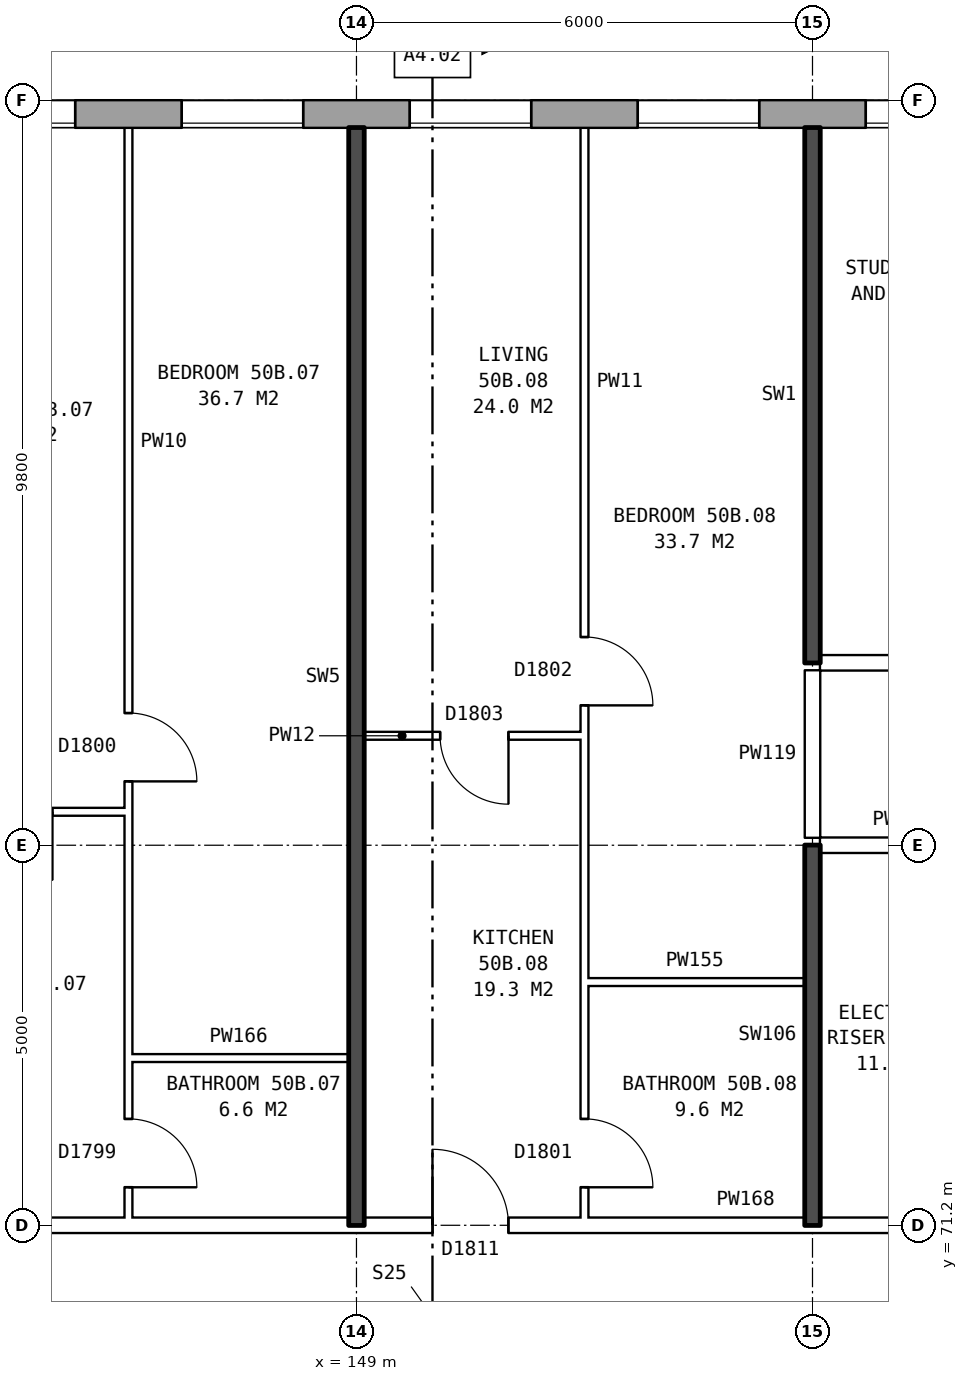
"""IFC4 building model, lengths in metres.
Left out: names, types, materials, properties, quantities, classifications, styles, units other than length and angle.
Written with IfcOpenShell. Run it as: python <this file> out.ifc"""

import sys

from ifc_helpers import new_model, si_unit, direction, frame, frame_2d, origin, place, context, subcontext, project, spatial, rectangle, extrude, element, fill, save


model = new_model("IFC4")
c1 = context("Model", 3, precision=1e-05, world=origin(), true_north=direction((0.0, 1.0)))
c2 = subcontext(c1, "Body", "Model", "MODEL_VIEW")
j1 = project(units=[si_unit("LENGTHUNIT", "METRE"), si_unit("PLANEANGLEUNIT", "RADIAN")], contexts=[c1])
p1 = place(None, origin())
s1 = spatial("IfcSite", under=j1, at=p1, CompositionType="ELEMENT")
p2 = place(p1, origin())
s2 = spatial("IfcBuilding", under=s1, at=p2, CompositionType="ELEMENT")
p3 = place(p2, frame((0.0, 0.0, 178.9)))
s3 = spatial("IfcBuildingStorey", under=s2, at=p3, CompositionType="ELEMENT", Elevation=178.9)
p4 = place(p3, frame((167.175, 85.82, 0.0), z_axis=(0.0, 0.0, 1.0), x_axis=(-1.0, 0.0, 0.0)))
e1 = element("IfcWall", 1, at=p4, inside=s3, PredefinedType="STANDARD", context=c2, shape_type="SweptSolid", body=[
    extrude(rectangle(XDim=33.101, YDim=0.36, at=frame_2d((16.55, 0.0))), origin(), (0.0, 0.0, 1.0), 2.85),
])
p5 = place(p4, frame((0.875, 0.0, 0.8)))
e2 = element("IfcOpeningElement", 2, at=p5, cuts=e1, PredefinedType="OPENING", context=c2, shape_type="SweptSolid", body=[
    extrude(rectangle(XDim=1.6, YDim=1.8, at=frame_2d((0.8, 0.9))), frame((0.0, 0.19, 0.0), z_axis=(0.0, -1.0, 0.0), x_axis=(1.0, 0.0, 0.0)), (0.0, 0.0, 1.0), 0.38),
])
p6 = place(p4, frame((2.8, 0.0, 1.4)))
e3 = element("IfcOpeningElement", 3, at=p6, cuts=e1, PredefinedType="OPENING", context=c2, shape_type="SweptSolid", body=[
    extrude(rectangle(XDim=1.4, YDim=1.2, at=frame_2d((0.7, 0.6))), frame((0.0, 0.19, 0.0), z_axis=(0.0, -1.0, 0.0), x_axis=(1.0, 0.0, 0.0)), (0.0, 0.0, 1.0), 0.38),
])
p7 = place(p4, frame((6.875, 0.0, 0.8)))
e4 = element("IfcOpeningElement", 4, at=p7, cuts=e1, PredefinedType="OPENING", context=c2, shape_type="SweptSolid", body=[
    extrude(rectangle(XDim=1.6, YDim=1.8, at=frame_2d((0.8, 0.9))), frame((0.0, 0.19, 0.0), z_axis=(0.0, -1.0, 0.0), x_axis=(1.0, 0.0, 0.0)), (0.0, 0.0, 1.0), 0.38),
])
p8 = place(p4, frame((9.875, 0.0, 0.8)))
e5 = element("IfcOpeningElement", 5, at=p8, cuts=e1, PredefinedType="OPENING", context=c2, shape_type="SweptSolid", body=[
    extrude(rectangle(XDim=1.6, YDim=1.8, at=frame_2d((0.8, 0.9))), frame((0.0, 0.19, 0.0), z_axis=(0.0, -1.0, 0.0), x_axis=(1.0, 0.0, 0.0)), (0.0, 0.0, 1.0), 0.38),
])
p9 = place(p4, frame((12.875, 0.0, 0.8)))
e6 = element("IfcOpeningElement", 6, at=p9, cuts=e1, PredefinedType="OPENING", context=c2, shape_type="SweptSolid", body=[
    extrude(rectangle(XDim=1.6, YDim=1.8, at=frame_2d((0.8, 0.9))), frame((0.0, 0.19, 0.0), z_axis=(0.0, -1.0, 0.0), x_axis=(1.0, 0.0, 0.0)), (0.0, 0.0, 1.0), 0.38),
])
p10 = place(p4, frame((15.875, 0.0, 0.8)))
e7 = element("IfcOpeningElement", 7, at=p10, cuts=e1, PredefinedType="OPENING", context=c2, shape_type="SweptSolid", body=[
    extrude(rectangle(XDim=1.6, YDim=1.8, at=frame_2d((0.8, 0.9))), frame((0.0, 0.19, 0.0), z_axis=(0.0, -1.0, 0.0), x_axis=(1.0, 0.0, 0.0)), (0.0, 0.0, 1.0), 0.38),
])
p11 = place(p4, frame((18.875, 0.0, 0.8)))
e8 = element("IfcOpeningElement", 8, at=p11, cuts=e1, PredefinedType="OPENING", context=c2, shape_type="SweptSolid", body=[
    extrude(rectangle(XDim=1.6, YDim=1.8, at=frame_2d((0.8, 0.9))), frame((0.0, 0.19, 0.0), z_axis=(0.0, -1.0, 0.0), x_axis=(1.0, 0.0, 0.0)), (0.0, 0.0, 1.0), 0.38),
])
p12 = place(p4, frame((21.875, 0.0, 0.8)))
e9 = element("IfcOpeningElement", 9, at=p12, cuts=e1, PredefinedType="OPENING", context=c2, shape_type="SweptSolid", body=[
    extrude(rectangle(XDim=1.6, YDim=1.8, at=frame_2d((0.8, 0.9))), frame((0.0, 0.19, 0.0), z_axis=(0.0, -1.0, 0.0), x_axis=(1.0, 0.0, 0.0)), (0.0, 0.0, 1.0), 0.38),
])
p13 = place(p4, frame((24.875, 0.0, 0.8)))
e10 = element("IfcOpeningElement", 10, at=p13, cuts=e1, PredefinedType="OPENING", context=c2, shape_type="SweptSolid", body=[
    extrude(rectangle(XDim=1.6, YDim=1.8, at=frame_2d((0.8, 0.9))), frame((0.0, 0.19, 0.0), z_axis=(0.0, -1.0, 0.0), x_axis=(1.0, 0.0, 0.0)), (0.0, 0.0, 1.0), 0.38),
])
p14 = place(p4, frame((26.775, 0.0, 0.8)))
e11 = element("IfcOpeningElement", 11, at=p14, cuts=e1, PredefinedType="OPENING", context=c2, shape_type="SweptSolid", body=[
    extrude(rectangle(XDim=0.8, YDim=0.9, at=frame_2d((0.4, 0.45))), frame((0.0, 0.19, 0.0), z_axis=(0.0, -1.0, 0.0), x_axis=(1.0, 0.0, 0.0)), (0.0, 0.0, 1.0), 0.38),
])
p15 = place(p4, frame((30.875, 0.0, 0.8)))
e12 = element("IfcOpeningElement", 12, at=p15, cuts=e1, PredefinedType="OPENING", context=c2, shape_type="SweptSolid", body=[
    extrude(rectangle(XDim=1.6, YDim=1.8, at=frame_2d((0.8, 0.9))), frame((0.0, 0.19, 0.0), z_axis=(0.0, -1.0, 0.0), x_axis=(1.0, 0.0, 0.0)), (0.0, 0.0, 1.0), 0.38),
])
p16 = place(p4, frame((28.925, 0.0, 1.4)))
e13 = element("IfcOpeningElement", 13, at=p16, cuts=e1, PredefinedType="OPENING", context=c2, shape_type="SweptSolid", body=[
    extrude(rectangle(XDim=1.0, YDim=1.2, at=frame_2d((0.5, 0.6))), frame((0.0, 0.19, 0.0), z_axis=(0.0, -1.0, 0.0), x_axis=(1.0, 0.0, 0.0)), (0.0, 0.0, 1.0), 0.38),
])
p17 = place(p3, frame((142.76, 71.2, 0.0), z_axis=(0.0, 0.0, 1.0), x_axis=(1.0, 0.0, 0.0)))
e14 = element("IfcWall", 14, at=p17, inside=s3, PredefinedType="PARTITIONING", context=c2, shape_type="SweptSolid", body=[
    extrude(rectangle(XDim=14.48, YDim=0.2, at=frame_2d((7.24, 0.0))), origin(), (0.0, 0.0, 1.0), 2.85),
])
p18 = place(p17, frame((1.12, 0.0, 0.0)))
e15 = element("IfcOpeningElement", 15, at=p18, cuts=e14, PredefinedType="OPENING", context=c2, shape_type="SweptSolid", body=[
    extrude(rectangle(XDim=1.0, YDim=2.1, at=frame_2d((0.5, 1.05))), frame((0.0, 0.11, 0.0), z_axis=(0.0, -1.0, 0.0), x_axis=(1.0, 0.0, 0.0)), (0.0, 0.0, 1.0), 0.22),
])
p19 = place(p17, frame((7.24, 0.0, 0.0)))
e16 = element("IfcOpeningElement", 16, at=p19, cuts=e14, PredefinedType="OPENING", context=c2, shape_type="SweptSolid", body=[
    extrude(rectangle(XDim=1.0, YDim=2.1, at=frame_2d((0.5, 1.05))), frame((0.0, 0.11, 0.0), z_axis=(0.0, -1.0, 0.0), x_axis=(1.0, 0.0, 0.0)), (0.0, 0.0, 1.0), 0.22),
])
for number, where, z_axis, x_axis in (
    (17, (146.0, 73.4, 0.0), (0.0, 0.0, 1.0), (1.0, 0.0, 0.0)),
    (18, (152.0, 74.4, 0.0), (0.0, 0.0, 1.0), (1.0, 0.0, 0.0)),
):
    element("IfcWall", number, at=place(p3, frame(where, z_axis=z_axis, x_axis=x_axis)), inside=s3, PredefinedType="PARTITIONING", context=c2, shape_type="SweptSolid", body=[
        extrude(rectangle(XDim=2.9, YDim=0.1, at=frame_2d((1.45, 0.0))), origin(), (0.0, 0.0, 1.0), 2.85),
    ])
p20 = place(p3, frame((155.1, 76.2, 0.0), z_axis=(0.0, 0.0, 1.0), x_axis=(1.0, 0.0, 0.0)))
e19 = element("IfcWall", 19, at=p20, inside=s3, PredefinedType="PARTITIONING", context=c2, shape_type="SweptSolid", body=[
    extrude(rectangle(XDim=2.14, YDim=0.2, at=frame_2d((1.07, 0.0))), origin(), (0.0, 0.0, 1.0), 2.85),
])
p21 = place(p3, frame((143.1, 76.64, 0.0), z_axis=(0.0, 0.0, 1.0), x_axis=(1.0, 0.0, 0.0)))
e20 = element("IfcWall", 20, at=p21, inside=s3, PredefinedType="PARTITIONING", context=c2, shape_type="SweptSolid", body=[
    extrude(rectangle(XDim=2.9, YDim=0.1, at=frame_2d((1.45, 0.0))), origin(), (0.0, 0.0, 1.0), 2.85),
])
p22 = place(p21, frame((1.0, 0.0, 0.0)))
e21 = element("IfcOpeningElement", 21, at=p22, cuts=e20, PredefinedType="OPENING", context=c2, shape_type="SweptSolid", body=[
    extrude(rectangle(XDim=0.9, YDim=2.1, at=frame_2d((0.45, 1.05))), frame((0.0, 0.06, 0.0), z_axis=(0.0, -1.0, 0.0), x_axis=(1.0, 0.0, 0.0)), (0.0, 0.0, 1.0), 0.12),
])
p23 = place(p3, frame((149.1, 77.64, 0.0), z_axis=(0.0, 0.0, 1.0), x_axis=(1.0, 0.0, 0.0)))
e22 = element("IfcWall", 22, at=p23, inside=s3, PredefinedType="PARTITIONING", context=c2, shape_type="SweptSolid", body=[
    extrude(rectangle(XDim=2.9, YDim=0.1, at=frame_2d((1.45, 0.0))), origin(), (0.0, 0.0, 1.0), 2.85),
])
p24 = place(p23, frame((1.0, 0.0, 0.0)))
e23 = element("IfcOpeningElement", 23, at=p24, cuts=e22, PredefinedType="OPENING", context=c2, shape_type="SweptSolid", body=[
    extrude(rectangle(XDim=0.9, YDim=2.1, at=frame_2d((0.45, 1.05))), frame((0.0, 0.06, 0.0), z_axis=(0.0, -1.0, 0.0), x_axis=(1.0, 0.0, 0.0)), (0.0, 0.0, 1.0), 0.12),
])
p25 = place(p3, frame((155.1, 78.6, 0.0), z_axis=(0.0, 0.0, 1.0), x_axis=(1.0, 0.0, 0.0)))
e24 = element("IfcWall", 24, at=p25, inside=s3, PredefinedType="PARTITIONING", context=c2, shape_type="SweptSolid", body=[
    extrude(rectangle(XDim=14.79, YDim=0.2, at=frame_2d((7.395, 0.0))), origin(), (0.0, 0.0, 1.0), 2.85),
])
p26 = place(p25, frame((1.45, 0.0, 0.0)))
e25 = element("IfcOpeningElement", 25, at=p26, cuts=e24, PredefinedType="OPENING", context=c2, shape_type="SweptSolid", body=[
    extrude(rectangle(XDim=1.0, YDim=2.1, at=frame_2d((0.5, 1.05))), frame((0.0, 0.11, 0.0), z_axis=(0.0, -1.0, 0.0), x_axis=(1.0, 0.0, 0.0)), (0.0, 0.0, 1.0), 0.22),
])
p27 = place(p25, frame((11.045, 0.0, 0.0)))
e26 = element("IfcOpeningElement", 26, at=p27, cuts=e24, PredefinedType="OPENING", context=c2, shape_type="SweptSolid", body=[
    extrude(rectangle(XDim=1.0, YDim=2.1, at=frame_2d((0.5, 1.05))), frame((0.0, 0.11, 0.0), z_axis=(0.0, -1.0, 0.0), x_axis=(1.0, 0.0, 0.0)), (0.0, 0.0, 1.0), 0.22),
])
p28 = place(p3, frame((146.0, 71.3, 0.0), z_axis=(0.0, 0.0, 1.0), x_axis=(0.0, 1.0, 0.0)))
e27 = element("IfcWall", 27, at=p28, inside=s3, PredefinedType="PARTITIONING", context=c2, shape_type="SweptSolid", body=[
    extrude(rectangle(XDim=14.34, YDim=0.1, at=frame_2d((7.17, 0.0))), origin(), (0.0, 0.0, 1.0), 2.85),
])
p29 = place(p28, frame((5.74, 0.0, 0.0)))
e28 = element("IfcOpeningElement", 28, at=p29, cuts=e27, PredefinedType="OPENING", context=c2, shape_type="SweptSolid", body=[
    extrude(rectangle(XDim=0.9, YDim=2.1, at=frame_2d((0.45, 1.05))), frame((0.0, 0.06, 0.0), z_axis=(0.0, -1.0, 0.0), x_axis=(1.0, 0.0, 0.0)), (0.0, 0.0, 1.0), 0.12),
])
p30 = place(p28, frame((0.4, 0.0, 0.0)))
e29 = element("IfcOpeningElement", 29, at=p30, cuts=e27, PredefinedType="OPENING", context=c2, shape_type="SweptSolid", body=[
    extrude(rectangle(XDim=0.9, YDim=2.1, at=frame_2d((0.45, 1.05))), frame((0.0, 0.06, 0.0), z_axis=(0.0, -1.0, 0.0), x_axis=(1.0, 0.0, 0.0)), (0.0, 0.0, 1.0), 0.12),
])
p31 = place(p3, frame((149.0, 71.2, 0.0), z_axis=(0.0, 0.0, 1.0), x_axis=(0.0, 1.0, 0.0)))
e30 = element("IfcWall", 30, at=p31, inside=s3, PredefinedType="SOLIDWALL", context=c2, shape_type="SweptSolid", body=[
    extrude(rectangle(XDim=14.44, YDim=0.2, at=frame_2d((7.22, 0.0))), origin(), (0.0, 0.0, 1.0), 2.85),
])
p32 = place(p3, frame((152.0, 71.3, 0.0), z_axis=(0.0, 0.0, 1.0), x_axis=(0.0, 1.0, 0.0)))
e31 = element("IfcWall", 31, at=p32, inside=s3, PredefinedType="PARTITIONING", context=c2, shape_type="SweptSolid", body=[
    extrude(rectangle(XDim=14.34, YDim=0.1, at=frame_2d((7.17, 0.0))), origin(), (0.0, 0.0, 1.0), 2.85),
])
p33 = place(p32, frame((6.74, 0.0, 0.0)))
e32 = element("IfcOpeningElement", 32, at=p33, cuts=e31, PredefinedType="OPENING", context=c2, shape_type="SweptSolid", body=[
    extrude(rectangle(XDim=0.9, YDim=2.1, at=frame_2d((0.45, 1.05))), frame((0.0, 0.06, 0.0), z_axis=(0.0, -1.0, 0.0), x_axis=(1.0, 0.0, 0.0)), (0.0, 0.0, 1.0), 0.12),
])
p34 = place(p32, frame((0.4, 0.0, 0.0)))
e33 = element("IfcOpeningElement", 33, at=p34, cuts=e31, PredefinedType="OPENING", context=c2, shape_type="SweptSolid", body=[
    extrude(rectangle(XDim=0.9, YDim=2.1, at=frame_2d((0.45, 1.05))), frame((0.0, 0.06, 0.0), z_axis=(0.0, -1.0, 0.0), x_axis=(1.0, 0.0, 0.0)), (0.0, 0.0, 1.0), 0.12),
])
p35 = place(p3, frame((155.0, 71.2, 0.0), z_axis=(0.0, 0.0, 1.0), x_axis=(0.0, 1.0, 0.0)))
e34 = element("IfcWall", 34, at=p35, inside=s3, PredefinedType="SOLIDWALL", context=c2, shape_type="SweptSolid", body=[
    extrude(rectangle(XDim=5.0, YDim=0.2, at=frame_2d((2.5, 0.0))), origin(), (0.0, 0.0, 1.0), 2.85),
])
p36 = place(p3, frame((155.0, 76.3, 0.0), z_axis=(0.0, 0.0, 1.0), x_axis=(0.0, 1.0, 0.0)))
e35 = element("IfcWall", 35, at=p36, inside=s3, PredefinedType="PARTITIONING", context=c2, shape_type="SweptSolid", body=[
    extrude(rectangle(XDim=2.2, YDim=0.2, at=frame_2d((1.1, 0.0))), origin(), (0.0, 0.0, 1.0), 2.85),
])
p37 = place(p3, frame((155.0, 78.6, 0.0), z_axis=(0.0, 0.0, 1.0), x_axis=(0.0, 1.0, 0.0)))
e36 = element("IfcWall", 36, at=p37, inside=s3, PredefinedType="SOLIDWALL", context=c2, shape_type="SweptSolid", body=[
    extrude(rectangle(XDim=7.04, YDim=0.2, at=frame_2d((3.52, 0.0))), origin(), (0.0, 0.0, 1.0), 2.85),
])
p38 = place(p8, origin())
e37 = element("IfcWindow", 37, at=p38, inside=s3, PartitioningType="SINGLE_PANEL", PredefinedType="WINDOW", context=c2, shape_type="SweptSolid", body=[
    extrude(rectangle(XDim=1.6, YDim=1.8, at=frame_2d((0.8, 0.9))), frame((0.0, 0.15, 0.0), z_axis=(0.0, -1.0, 0.0), x_axis=(1.0, 0.0, 0.0)), (0.0, 0.0, 1.0), 0.06),
])
fill(e5, e37)
p39 = place(p9, origin())
e38 = element("IfcWindow", 38, at=p39, inside=s3, PartitioningType="SINGLE_PANEL", PredefinedType="WINDOW", context=c2, shape_type="SweptSolid", body=[
    extrude(rectangle(XDim=1.6, YDim=1.8, at=frame_2d((0.8, 0.9))), frame((0.0, 0.15, 0.0), z_axis=(0.0, -1.0, 0.0), x_axis=(1.0, 0.0, 0.0)), (0.0, 0.0, 1.0), 0.06),
])
fill(e6, e38)
p40 = place(p10, origin())
e39 = element("IfcWindow", 39, at=p40, inside=s3, PartitioningType="SINGLE_PANEL", PredefinedType="WINDOW", context=c2, shape_type="SweptSolid", body=[
    extrude(rectangle(XDim=1.6, YDim=1.8, at=frame_2d((0.8, 0.9))), frame((0.0, 0.15, 0.0), z_axis=(0.0, -1.0, 0.0), x_axis=(1.0, 0.0, 0.0)), (0.0, 0.0, 1.0), 0.06),
])
fill(e7, e39)
p41 = place(p11, origin())
e40 = element("IfcWindow", 40, at=p41, inside=s3, PartitioningType="SINGLE_PANEL", PredefinedType="WINDOW", context=c2, shape_type="SweptSolid", body=[
    extrude(rectangle(XDim=1.6, YDim=1.8, at=frame_2d((0.8, 0.9))), frame((0.0, 0.15, 0.0), z_axis=(0.0, -1.0, 0.0), x_axis=(1.0, 0.0, 0.0)), (0.0, 0.0, 1.0), 0.06),
])
fill(e8, e40)
p42 = place(p12, origin())
e41 = element("IfcWindow", 41, at=p42, inside=s3, PartitioningType="SINGLE_PANEL", PredefinedType="WINDOW", context=c2, shape_type="SweptSolid", body=[
    extrude(rectangle(XDim=1.6, YDim=1.8, at=frame_2d((0.8, 0.9))), frame((0.0, 0.15, 0.0), z_axis=(0.0, -1.0, 0.0), x_axis=(1.0, 0.0, 0.0)), (0.0, 0.0, 1.0), 0.06),
])
fill(e9, e41)
p43 = place(p29, frame((0.9, 0.0, 0.0), z_axis=(0.0, 0.0, 1.0), x_axis=(-1.0, 0.0, 0.0)))
e42 = element("IfcDoor", 42, at=p43, inside=s3, OperationType="SINGLE_SWING_RIGHT", PredefinedType="DOOR", context=c2, shape_type="SweptSolid", body=[
    extrude(rectangle(XDim=0.9, YDim=2.1, at=frame_2d((0.45, 1.05))), frame((0.0, 0.025, 0.0), z_axis=(0.0, -1.0, 0.0), x_axis=(1.0, 0.0, 0.0)), (0.0, 0.0, 1.0), 0.05),
])
fill(e28, e42)
p44 = place(p30, frame((0.9, 0.0, 0.0), z_axis=(0.0, 0.0, 1.0), x_axis=(-1.0, 0.0, 0.0)))
e43 = element("IfcDoor", 43, at=p44, inside=s3, OperationType="SINGLE_SWING_RIGHT", PredefinedType="DOOR", context=c2, shape_type="SweptSolid", body=[
    extrude(rectangle(XDim=0.9, YDim=2.1, at=frame_2d((0.45, 1.05))), frame((0.0, 0.025, 0.0), z_axis=(0.0, -1.0, 0.0), x_axis=(1.0, 0.0, 0.0)), (0.0, 0.0, 1.0), 0.05),
])
fill(e29, e43)
p45 = place(p33, frame((0.9, 0.0, 0.0), z_axis=(0.0, 0.0, 1.0), x_axis=(-1.0, 0.0, 0.0)))
e44 = element("IfcDoor", 44, at=p45, inside=s3, OperationType="SINGLE_SWING_RIGHT", PredefinedType="DOOR", context=c2, shape_type="SweptSolid", body=[
    extrude(rectangle(XDim=0.9, YDim=2.1, at=frame_2d((0.45, 1.05))), frame((0.0, 0.025, 0.0), z_axis=(0.0, -1.0, 0.0), x_axis=(1.0, 0.0, 0.0)), (0.0, 0.0, 1.0), 0.05),
])
fill(e32, e44)
p46 = place(p19, origin())
e45 = element("IfcDoor", 45, at=p46, inside=s3, OperationType="SINGLE_SWING_LEFT", PredefinedType="DOOR", context=c2, shape_type="SweptSolid", body=[
    extrude(rectangle(XDim=1.0, YDim=2.1, at=frame_2d((0.5, 1.05))), frame((0.0, 0.025, 0.0), z_axis=(0.0, -1.0, 0.0), x_axis=(1.0, 0.0, 0.0)), (0.0, 0.0, 1.0), 0.05),
])
fill(e16, e45)
p47 = place(p24, frame((0.9, 0.0, 0.0), z_axis=(0.0, 0.0, 1.0), x_axis=(-1.0, 0.0, 0.0)))
e46 = element("IfcDoor", 46, at=p47, inside=s3, OperationType="SINGLE_SWING_LEFT", PredefinedType="DOOR", context=c2, shape_type="SweptSolid", body=[
    extrude(rectangle(XDim=0.9, YDim=2.1, at=frame_2d((0.45, 1.05))), frame((0.0, 0.025, 0.0), z_axis=(0.0, -1.0, 0.0), x_axis=(1.0, 0.0, 0.0)), (0.0, 0.0, 1.0), 0.05),
])
fill(e23, e46)
p48 = place(p34, frame((0.9, 0.0, 0.0), z_axis=(0.0, 0.0, 1.0), x_axis=(-1.0, 0.0, 0.0)))
e47 = element("IfcDoor", 47, at=p48, inside=s3, OperationType="SINGLE_SWING_RIGHT", PredefinedType="DOOR", context=c2, shape_type="SweptSolid", body=[
    extrude(rectangle(XDim=0.9, YDim=2.1, at=frame_2d((0.45, 1.05))), frame((0.0, 0.025, 0.0), z_axis=(0.0, -1.0, 0.0), x_axis=(1.0, 0.0, 0.0)), (0.0, 0.0, 1.0), 0.05),
])
fill(e33, e47)
save(model, sys.argv[1])
